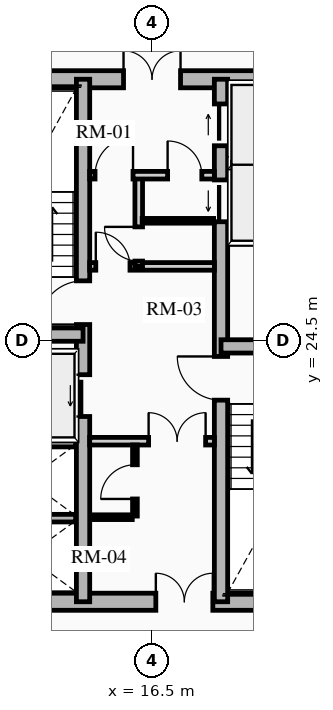
"""IFC4 building model, lengths in metres.
Left out: names, types, materials, properties, quantities, classifications, styles, units other than length and angle.
Written with IfcOpenShell. Run it as: python <this file> out.ifc"""

import sys

from ifc_helpers import new_model, si_unit, direction, frame, frame_2d, origin, place, context, subcontext, project, spatial, rectangle, extrude, source, transform, mapped, element, fill, save


model = new_model("IFC4")
c1 = context("Model", 3, precision=1e-05, world=origin(), true_north=direction((0.0, 1.0)))
c2 = subcontext(c1, "Body", "Model", "MODEL_VIEW")
j1 = project(units=[si_unit("LENGTHUNIT", "METRE"), si_unit("PLANEANGLEUNIT", "RADIAN")], contexts=[c1])
p1 = place(None, origin())
s1 = spatial("IfcSite", under=j1, at=p1, CompositionType="ELEMENT")
p2 = place(p1, origin())
s2 = spatial("IfcBuilding", under=s1, at=p2, CompositionType="ELEMENT")
p3 = place(p2, frame((0.0, 0.0, 73.06)))
s3 = spatial("IfcBuildingStorey", under=s2, at=p3, CompositionType="ELEMENT", Elevation=73.06)
p4 = place(p3, frame((11.15, 17.625, 0.0), z_axis=(0.0, 0.0, 1.0), x_axis=(1.0, 0.0, 0.0)))
e1 = element("IfcWall", 1, at=p4, inside=s3, PredefinedType="SHEAR", context=c2, shape_type="SweptSolid", body=[
    extrude(rectangle(XDim=10.7, YDim=0.45, at=frame_2d((5.35, 0.0))), origin(), (0.0, 0.0, 1.0), 2.91),
])
m1 = source(origin(), c2, "Body", "SweptSolid", [
    extrude(rectangle(XDim=1.5, YDim=2.02, at=frame_2d((0.75, 1.01))), frame((0.0, 0.235, 0.0), z_axis=(0.0, -1.0, 0.0), x_axis=(1.0, 0.0, 0.0)), (0.0, 0.0, 1.0), 0.47),
])
p5 = place(p4, frame((5.45, 0.0, 0.0)))
e2 = element("IfcOpeningElement", 2, at=p5, cuts=e1, PredefinedType="OPENING", context=c2, shape_type="MappedRepresentation", body=[
    mapped(m1, transform((0.0, 0.0, 0.0), x_axis=(1.0, 0.0, 0.0), y_axis=(0.0, 1.0, 0.0), z_axis=(0.0, 0.0, 1.0), scale=1.0)),
])
p6 = place(p3, frame((11.15, 31.375, 0.0), z_axis=(0.0, 0.0, 1.0), x_axis=(1.0, 0.0, 0.0)))
e3 = element("IfcWall", 3, at=p6, inside=s3, PredefinedType="SHEAR", context=c2, shape_type="SweptSolid", body=[
    extrude(rectangle(XDim=10.7, YDim=0.45, at=frame_2d((5.35, 0.0))), origin(), (0.0, 0.0, 1.0), 2.91),
])
p7 = place(p6, frame((4.6, 0.0, 0.0)))
e4 = element("IfcOpeningElement", 4, at=p7, cuts=e3, PredefinedType="OPENING", context=c2, shape_type="MappedRepresentation", body=[
    mapped(m1, transform((0.0, 0.0, 0.0), x_axis=(1.0, 0.0, 0.0), y_axis=(0.0, 1.0, 0.0), z_axis=(0.0, 0.0, 1.0), scale=1.0)),
])
p8 = place(p3, frame((14.685, 17.625, 0.0), z_axis=(0.0, 0.0, 1.0), x_axis=(0.0, 1.0, 0.0)))
e5 = element("IfcWall", 5, at=p8, inside=s3, PredefinedType="SHEAR", context=c2, shape_type="SweptSolid", body=[
    extrude(rectangle(XDim=13.75, YDim=0.35, at=frame_2d((6.875, 0.0))), origin(), (0.0, 0.0, 1.0), 2.91),
])
m2 = source(origin(), c2, "Body", "SweptSolid", [
    extrude(rectangle(XDim=1.1, YDim=2.015, at=frame_2d((0.55, 1.007))), frame((0.0, 0.185, 0.0), z_axis=(0.0, -1.0, 0.0), x_axis=(1.0, 0.0, 0.0)), (0.0, 0.0, 1.0), 0.37),
])
p9 = place(p8, frame((4.875, 0.0, 0.0)))
e6 = element("IfcOpeningElement", 6, at=p9, cuts=e5, PredefinedType="OPENING", context=c2, shape_type="MappedRepresentation", body=[
    mapped(m2, transform((0.0, 0.0, 0.0), x_axis=(1.0, 0.0, 0.0), y_axis=(0.0, 1.0, 0.0), z_axis=(0.0, 0.0, 1.0), scale=1.0)),
])
m3 = source(origin(), c2, "Body", "SweptSolid", [
    extrude(rectangle(XDim=1.15, YDim=2.02, at=frame_2d((0.575, 1.01))), frame((0.0, 0.185, 0.0), z_axis=(0.0, -1.0, 0.0), x_axis=(1.0, 0.0, 0.0)), (0.0, 0.0, 1.0), 0.37),
])
p10 = place(p8, frame((7.295, 0.0, 0.0)))
e7 = element("IfcOpeningElement", 7, at=p10, cuts=e5, PredefinedType="OPENING", context=c2, shape_type="MappedRepresentation", body=[
    mapped(m3, transform((0.0, 0.0, 0.0), x_axis=(1.0, 0.0, 0.0), y_axis=(0.0, 1.0, 0.0), z_axis=(0.0, 0.0, 1.0), scale=1.0)),
])
p11 = place(p3, frame((18.315, 17.625, 0.0), z_axis=(0.0, 0.0, 1.0), x_axis=(0.0, 1.0, 0.0)))
e8 = element("IfcWall", 8, at=p11, inside=s3, PredefinedType="SHEAR", context=c2, shape_type="SweptSolid", body=[
    extrude(rectangle(XDim=13.75, YDim=0.35, at=frame_2d((6.875, 0.0))), origin(), (0.0, 0.0, 1.0), 2.91),
])
p12 = place(p11, frame((10.0, 0.0, 0.0)))
e9 = element("IfcOpeningElement", 9, at=p12, cuts=e8, PredefinedType="OPENING", context=c2, shape_type="MappedRepresentation", body=[
    mapped(m2, transform((0.0, 0.0, 0.0), x_axis=(1.0, 0.0, 0.0), y_axis=(0.0, 1.0, 0.0), z_axis=(0.0, 0.0, 1.0), scale=1.0)),
])
p13 = place(p11, frame((12.0, 0.0, 0.0)))
e10 = element("IfcOpeningElement", 10, at=p13, cuts=e8, PredefinedType="OPENING", context=c2, shape_type="MappedRepresentation", body=[
    mapped(m2, transform((0.0, 0.0, 0.0), x_axis=(1.0, 0.0, 0.0), y_axis=(0.0, 1.0, 0.0), z_axis=(0.0, 0.0, 1.0), scale=1.0)),
])
p14 = place(p11, frame((5.305, 0.0, 0.0)))
e11 = element("IfcOpeningElement", 11, at=p14, cuts=e8, PredefinedType="OPENING", context=c2, shape_type="MappedRepresentation", body=[
    mapped(m3, transform((0.0, 0.0, 0.0), x_axis=(1.0, 0.0, 0.0), y_axis=(0.0, 1.0, 0.0), z_axis=(0.0, 0.0, 1.0), scale=1.0)),
])
for number, where, z_axis, x_axis in (
    (12, (11.4, 24.655, 0.0), (0.0, 0.0, 1.0), (1.0, 0.0, 0.0)),
    (13, (18.315, 24.345, 0.0), (0.0, 0.0, 1.0), (1.0, 0.0, 0.0)),
):
    element("IfcWall", number, at=place(p3, frame(where, z_axis=z_axis, x_axis=x_axis)), inside=s3, PredefinedType="SHEAR", context=c2, shape_type="SweptSolid", body=[
        extrude(rectangle(XDim=3.285, YDim=0.35, at=frame_2d((1.643, 0.0))), origin(), (0.0, 0.0, 1.0), 2.91),
    ])
for number, where, z_axis, x_axis in (
    (14, (11.52, 21.8, 0.0), (0.0, 0.0, 1.0), (1.0, 0.0, 0.0)),
    (15, (11.52, 19.825, 0.0), (0.0, 0.0, 1.0), (1.0, 0.0, 0.0)),
    (16, (18.51, 27.13, 0.0), (0.0, 0.0, 1.0), (1.0, 0.0, 0.0)),
    (17, (18.51, 29.175, 0.0), (0.0, 0.0, 1.0), (1.0, 0.0, 0.0)),
):
    element("IfcWall", number, at=place(p3, frame(where, z_axis=z_axis, x_axis=x_axis)), inside=s3, PredefinedType="SHEAR", context=c2, shape_type="SweptSolid", body=[
        extrude(rectangle(XDim=2.97, YDim=0.2, at=frame_2d((1.485, 0.0))), origin(), (0.0, 0.0, 1.0), 2.91),
    ])
p15 = place(p3, frame((14.86, 21.85, 0.0), z_axis=(0.0, 0.0, 1.0), x_axis=(1.0, 0.0, 0.0)))
e18 = element("IfcWall", 18, at=p15, inside=s3, PredefinedType="PARTITIONING", context=c2, shape_type="SweptSolid", body=[
    extrude(rectangle(XDim=3.28, YDim=0.2, at=frame_2d((1.64, 0.0))), origin(), (0.0, 0.0, 1.0), 2.655),
])
m4 = source(origin(), c2, "Body", "SweptSolid", [
    extrude(rectangle(XDim=1.5, YDim=2.02, at=frame_2d((0.75, 1.01))), frame((0.0, 0.11, 0.0), z_axis=(0.0, -1.0, 0.0), x_axis=(1.0, 0.0, 0.0)), (0.0, 0.0, 1.0), 0.22),
])
p16 = place(p15, frame((1.55, 0.0, 0.0)))
e19 = element("IfcOpeningElement", 19, at=p16, cuts=e18, PredefinedType="OPENING", context=c2, shape_type="MappedRepresentation", body=[
    mapped(m4, transform((0.0, 0.0, 0.0), x_axis=(1.0, 0.0, 0.0), y_axis=(0.0, 1.0, 0.0), z_axis=(0.0, 0.0, 1.0), scale=1.0)),
])
p17 = place(p3, frame((14.86, 26.45, 0.0), z_axis=(0.0, 0.0, 1.0), x_axis=(1.0, 0.0, 0.0)))
e20 = element("IfcWall", 20, at=p17, inside=s3, PredefinedType="PARTITIONING", context=c2, shape_type="SweptSolid", body=[
    extrude(rectangle(XDim=3.28, YDim=0.2, at=frame_2d((1.64, 0.0))), origin(), (0.0, 0.0, 1.0), 2.655),
])
m5 = source(origin(), c2, "Body", "SweptSolid", [
    extrude(rectangle(XDim=0.9, YDim=2.005, at=frame_2d((0.45, 1.002))), frame((0.0, 0.11, 0.0), z_axis=(0.0, -1.0, 0.0), x_axis=(1.0, 0.0, 0.0)), (0.0, 0.0, 1.0), 0.22),
])
p18 = place(p17, frame((0.16, 0.0, 0.0)))
e21 = element("IfcOpeningElement", 21, at=p18, cuts=e20, PredefinedType="OPENING", context=c2, shape_type="MappedRepresentation", body=[
    mapped(m5, transform((0.0, 0.0, 0.0), x_axis=(1.0, 0.0, 0.0), y_axis=(0.0, 1.0, 0.0), z_axis=(0.0, 0.0, 1.0), scale=1.0)),
])
p19 = place(p3, frame((16.15, 26.45, 0.0), z_axis=(0.0, 0.0, 1.0), x_axis=(0.0, 1.0, 0.0)))
e22 = element("IfcWall", 22, at=p19, inside=s3, PredefinedType="PARTITIONING", context=c2, shape_type="SweptSolid", body=[
    extrude(rectangle(XDim=2.4, YDim=0.2, at=frame_2d((1.2, 0.0))), origin(), (0.0, 0.0, 1.0), 2.655),
])
p20 = place(p19, frame((0.14, 0.0, 0.0)))
e23 = element("IfcOpeningElement", 23, at=p20, cuts=e22, PredefinedType="OPENING", context=c2, shape_type="MappedRepresentation", body=[
    mapped(m5, transform((0.0, 0.0, 0.0), x_axis=(1.0, 0.0, 0.0), y_axis=(0.0, 1.0, 0.0), z_axis=(0.0, 0.0, 1.0), scale=1.0)),
])
p21 = place(p3, frame((14.86, 28.85, 0.0), z_axis=(0.0, 0.0, 1.0), x_axis=(1.0, 0.0, 0.0)))
e24 = element("IfcWall", 24, at=p21, inside=s3, PredefinedType="PARTITIONING", context=c2, shape_type="SweptSolid", body=[
    extrude(rectangle(XDim=3.28, YDim=0.2, at=frame_2d((1.64, 0.0))), origin(), (0.0, 0.0, 1.0), 2.655),
])
m6 = source(origin(), c2, "Body", "SweptSolid", [
    extrude(rectangle(XDim=1.0, YDim=2.015, at=frame_2d((0.5, 1.007))), frame((0.0, 0.11, 0.0), z_axis=(0.0, -1.0, 0.0), x_axis=(1.0, 0.0, 0.0)), (0.0, 0.0, 1.0), 0.22),
])
p22 = place(p21, frame((0.14, 0.0, 0.0)))
e25 = element("IfcOpeningElement", 25, at=p22, cuts=e24, PredefinedType="OPENING", context=c2, shape_type="MappedRepresentation", body=[
    mapped(m6, transform((0.0, 0.0, 0.0), x_axis=(1.0, 0.0, 0.0), y_axis=(0.0, 1.0, 0.0), z_axis=(0.0, 0.0, 1.0), scale=1.0)),
])
p23 = place(p21, frame((2.05, 0.0, 0.0)))
e26 = element("IfcOpeningElement", 26, at=p23, cuts=e24, PredefinedType="OPENING", context=c2, shape_type="MappedRepresentation", body=[
    mapped(m5, transform((0.0, 0.0, 0.0), x_axis=(1.0, 0.0, 0.0), y_axis=(0.0, 1.0, 0.0), z_axis=(0.0, 0.0, 1.0), scale=1.0)),
])
p24 = place(p3, frame((16.05, 19.88, 0.0), z_axis=(0.0, 0.0, 1.0), x_axis=(0.0, 1.0, 0.0)))
e27 = element("IfcWall", 27, at=p24, inside=s3, PredefinedType="PARTITIONING", context=c2, shape_type="SweptSolid", body=[
    extrude(rectangle(XDim=1.87, YDim=0.125, at=frame_2d((0.935, 0.0))), origin(), (0.0, 0.0, 1.0), 2.655),
])
m7 = source(origin(), c2, "Body", "SweptSolid", [
    extrude(rectangle(XDim=0.9, YDim=2.005, at=frame_2d((0.45, 1.002))), frame((0.0, 0.073, 0.0), z_axis=(0.0, -1.0, 0.0), x_axis=(1.0, 0.0, 0.0)), (0.0, 0.0, 1.0), 0.145),
])
p25 = place(p24, frame((0.45, 0.0, 0.0)))
e28 = element("IfcOpeningElement", 28, at=p25, cuts=e27, PredefinedType="OPENING", context=c2, shape_type="MappedRepresentation", body=[
    mapped(m7, transform((0.0, 0.0, 0.0), x_axis=(1.0, 0.0, 0.0), y_axis=(0.0, 1.0, 0.0), z_axis=(0.0, 0.0, 1.0), scale=1.0)),
])
p26 = place(p3, frame((14.88, 19.85, 0.0), z_axis=(0.0, 0.0, 1.0), x_axis=(1.0, 0.0, 0.0)))
e29 = element("IfcWall", 29, at=p26, inside=s3, PredefinedType="PARTITIONING", context=c2, shape_type="SweptSolid", body=[
    extrude(rectangle(XDim=1.1, YDim=0.125, at=frame_2d((0.55, 0.0))), origin(), (0.0, 0.0, 1.0), 2.655),
])
p27 = place(p3, frame((16.24, 27.65, 0.0), z_axis=(0.0, 0.0, 1.0), x_axis=(1.0, 0.0, 0.0)))
e30 = element("IfcWall", 30, at=p27, inside=s3, PredefinedType="PARTITIONING", context=c2, shape_type="SweptSolid", body=[
    extrude(rectangle(XDim=1.88, YDim=0.125, at=frame_2d((0.94, 0.0))), origin(), (0.0, 0.0, 1.0), 2.655),
])
m8 = source(origin(), c2, "Body", "SweptSolid", [
    extrude(rectangle(XDim=1.1, YDim=2.015, at=frame_2d((0.55, 1.007))), frame((0.0, 0.025, 0.0), z_axis=(0.0, -1.0, 0.0), x_axis=(1.0, 0.0, 0.0)), (0.0, 0.0, 1.0), 0.05),
])
p28 = place(p9, origin())
e31 = element("IfcDoor", 31, at=p28, inside=s3, OperationType="SLIDING_TO_LEFT", PredefinedType="DOOR", context=c2, shape_type="MappedRepresentation", body=[
    mapped(m8, transform((0.0, 0.0, 0.0), x_axis=(1.0, 0.0, 0.0), y_axis=(0.0, 1.0, 0.0), z_axis=(0.0, 0.0, 1.0), scale=1.0)),
])
fill(e6, e31)
p29 = place(p12, origin())
e32 = element("IfcDoor", 32, at=p29, inside=s3, OperationType="SLIDING_TO_LEFT", PredefinedType="DOOR", context=c2, shape_type="MappedRepresentation", body=[
    mapped(m8, transform((0.0, 0.0, 0.0), x_axis=(1.0, 0.0, 0.0), y_axis=(0.0, 1.0, 0.0), z_axis=(0.0, 0.0, 1.0), scale=1.0)),
])
fill(e9, e32)
p30 = place(p13, origin())
e33 = element("IfcDoor", 33, at=p30, inside=s3, OperationType="SLIDING_TO_RIGHT", PredefinedType="DOOR", context=c2, shape_type="MappedRepresentation", body=[
    mapped(m8, transform((0.0, 0.0, 0.0), x_axis=(1.0, 0.0, 0.0), y_axis=(0.0, 1.0, 0.0), z_axis=(0.0, 0.0, 1.0), scale=1.0)),
])
fill(e10, e33)
m9 = source(origin(), c2, "Body", "SweptSolid", [
    extrude(rectangle(XDim=1.15, YDim=2.02, at=frame_2d((0.575, 1.01))), frame((0.0, 0.025, 0.0), z_axis=(0.0, -1.0, 0.0), x_axis=(1.0, 0.0, 0.0)), (0.0, 0.0, 1.0), 0.05),
])
p31 = place(p10, origin())
e34 = element("IfcDoor", 34, at=p31, inside=s3, OperationType="SINGLE_SWING_LEFT", PredefinedType="DOOR", context=c2, shape_type="MappedRepresentation", body=[
    mapped(m9, transform((0.0, 0.0, 0.0), x_axis=(1.0, 0.0, 0.0), y_axis=(0.0, 1.0, 0.0), z_axis=(0.0, 0.0, 1.0), scale=1.0)),
])
fill(e7, e34)
p32 = place(p14, origin())
e35 = element("IfcDoor", 35, at=p32, inside=s3, OperationType="SINGLE_SWING_RIGHT", PredefinedType="DOOR", context=c2, shape_type="MappedRepresentation", body=[
    mapped(m9, transform((0.0, 0.0, 0.0), x_axis=(1.0, 0.0, 0.0), y_axis=(0.0, 1.0, 0.0), z_axis=(0.0, 0.0, 1.0), scale=1.0)),
])
fill(e11, e35)
m10 = source(origin(), c2, "Body", "SweptSolid", [
    extrude(rectangle(XDim=1.5, YDim=2.02, at=frame_2d((0.75, 1.01))), frame((0.0, 0.025, 0.0), z_axis=(0.0, -1.0, 0.0), x_axis=(1.0, 0.0, 0.0)), (0.0, 0.0, 1.0), 0.05),
])
p33 = place(p7, origin())
e36 = element("IfcDoor", 36, at=p33, inside=s3, OperationType="DOUBLE_DOOR_SINGLE_SWING", PredefinedType="DOOR", context=c2, shape_type="MappedRepresentation", body=[
    mapped(m10, transform((0.0, 0.0, 0.0), x_axis=(1.0, 0.0, 0.0), y_axis=(0.0, 1.0, 0.0), z_axis=(0.0, 0.0, 1.0), scale=1.0)),
])
fill(e4, e36)
p34 = place(p5, origin())
e37 = element("IfcDoor", 37, at=p34, inside=s3, OperationType="DOUBLE_DOOR_SINGLE_SWING", PredefinedType="DOOR", context=c2, shape_type="MappedRepresentation", body=[
    mapped(m10, transform((0.0, 0.0, 0.0), x_axis=(1.0, 0.0, 0.0), y_axis=(0.0, 1.0, 0.0), z_axis=(0.0, 0.0, 1.0), scale=1.0)),
])
fill(e2, e37)
p35 = place(p16, origin())
e38 = element("IfcDoor", 38, at=p35, inside=s3, OperationType="DOUBLE_DOOR_SINGLE_SWING", PredefinedType="DOOR", context=c2, shape_type="MappedRepresentation", body=[
    mapped(m10, transform((0.0, 0.0, 0.0), x_axis=(1.0, 0.0, 0.0), y_axis=(0.0, 1.0, 0.0), z_axis=(0.0, 0.0, 1.0), scale=1.0)),
])
fill(e19, e38)
m11 = source(origin(), c2, "Body", "SweptSolid", [
    extrude(rectangle(XDim=0.9, YDim=2.005, at=frame_2d((0.45, 1.002))), frame((0.0, 0.025, 0.0), z_axis=(0.0, -1.0, 0.0), x_axis=(1.0, 0.0, 0.0)), (0.0, 0.0, 1.0), 0.05),
])
p36 = place(p18, origin())
e39 = element("IfcDoor", 39, at=p36, inside=s3, OperationType="SINGLE_SWING_LEFT", PredefinedType="DOOR", context=c2, shape_type="MappedRepresentation", body=[
    mapped(m11, transform((0.0, 0.0, 0.0), x_axis=(1.0, 0.0, 0.0), y_axis=(0.0, 1.0, 0.0), z_axis=(0.0, 0.0, 1.0), scale=1.0)),
])
fill(e21, e39)
m12 = source(origin(), c2, "Body", "SweptSolid", [
    extrude(rectangle(XDim=1.0, YDim=2.015, at=frame_2d((0.5, 1.007))), frame((0.0, 0.025, 0.0), z_axis=(0.0, -1.0, 0.0), x_axis=(1.0, 0.0, 0.0)), (0.0, 0.0, 1.0), 0.05),
])
p37 = place(p22, origin())
e40 = element("IfcDoor", 40, at=p37, inside=s3, OperationType="SINGLE_SWING_RIGHT", PredefinedType="DOOR", context=c2, shape_type="MappedRepresentation", body=[
    mapped(m12, transform((0.0, 0.0, 0.0), x_axis=(1.0, 0.0, 0.0), y_axis=(0.0, 1.0, 0.0), z_axis=(0.0, 0.0, 1.0), scale=1.0)),
])
fill(e25, e40)
p38 = place(p25, origin())
e41 = element("IfcDoor", 41, at=p38, inside=s3, OperationType="SINGLE_SWING_LEFT", PredefinedType="DOOR", context=c2, shape_type="MappedRepresentation", body=[
    mapped(m11, transform((0.0, 0.0, 0.0), x_axis=(1.0, 0.0, 0.0), y_axis=(0.0, 1.0, 0.0), z_axis=(0.0, 0.0, 1.0), scale=1.0)),
])
fill(e28, e41)
p39 = place(p20, origin())
e42 = element("IfcDoor", 42, at=p39, inside=s3, OperationType="SINGLE_SWING_RIGHT", PredefinedType="DOOR", context=c2, shape_type="MappedRepresentation", body=[
    mapped(m11, transform((0.0, 0.0, 0.0), x_axis=(1.0, 0.0, 0.0), y_axis=(0.0, 1.0, 0.0), z_axis=(0.0, 0.0, 1.0), scale=1.0)),
])
fill(e23, e42)
p40 = place(p23, origin())
e43 = element("IfcDoor", 43, at=p40, inside=s3, OperationType="SINGLE_SWING_LEFT", PredefinedType="DOOR", context=c2, shape_type="MappedRepresentation", body=[
    mapped(m11, transform((0.0, 0.0, 0.0), x_axis=(1.0, 0.0, 0.0), y_axis=(0.0, 1.0, 0.0), z_axis=(0.0, 0.0, 1.0), scale=1.0)),
])
fill(e26, e43)
save(model, sys.argv[1])
